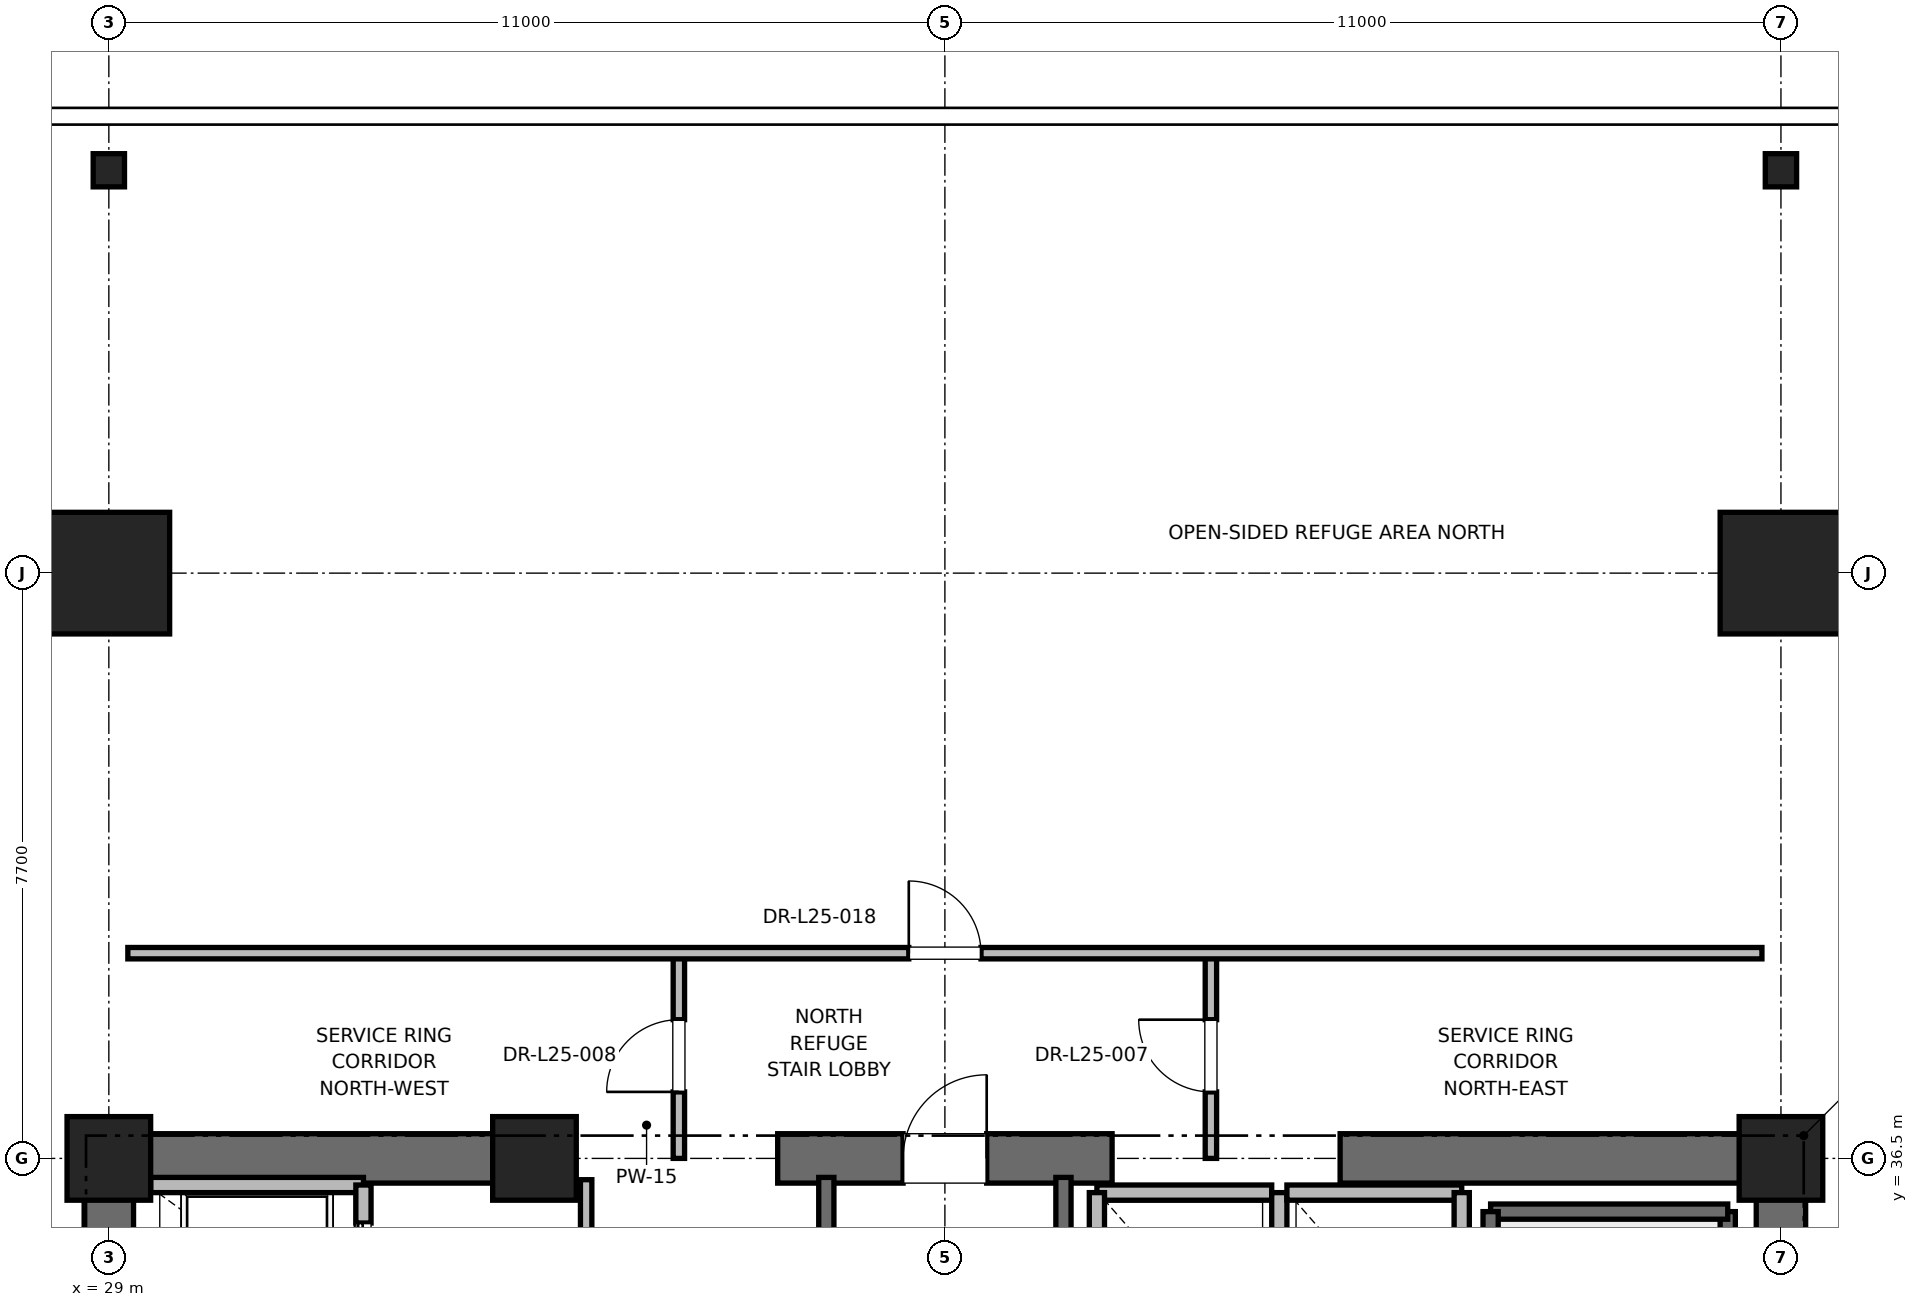
"""IFC4 building model, lengths in metres.
Left out: names, types, materials, properties, quantities, classifications, styles, units other than length and angle.
Written with IfcOpenShell. Run it as: python <this file> out.ifc"""

import sys

from ifc_helpers import new_model, si_unit, direction, frame, frame_2d, origin, origin_2d, place, context, subcontext, project, spatial, rectangle, i_section, extrude, element, fill, save


model = new_model("IFC4")
c1 = context("Model", 3, precision=1e-05, world=origin(), true_north=direction((0.0, 1.0)))
c2 = subcontext(c1, "Body", "Model", "MODEL_VIEW")
j1 = project(units=[si_unit("LENGTHUNIT", "METRE"), si_unit("PLANEANGLEUNIT", "RADIAN")], contexts=[c1])
p1 = place(None, origin())
s1 = spatial("IfcSite", under=j1, at=p1, CompositionType="ELEMENT")
p2 = place(p1, origin())
s2 = spatial("IfcBuilding", under=s1, at=p2, CompositionType="ELEMENT")
p3 = place(p2, frame((0.0, 0.0, 107.6)))
s3 = spatial("IfcBuildingStorey", under=s2, at=p3, CompositionType="ELEMENT", Elevation=107.6)
for number, where, z_axis, x_axis in (
    (1, (29.0, 44.2, 0.0), (0.0, 0.0, 1.0), (1.0, 0.0, 0.0)),
    (2, (51.0, 44.2, 0.0), (0.0, 0.0, 1.0), (1.0, 0.0, 0.0)),
):
    element("IfcColumn", number, at=place(p3, frame(where, z_axis=z_axis, x_axis=x_axis)), inside=s3, PredefinedType="COLUMN", context=c2, shape_type="SweptSolid", body=[
        extrude(rectangle(XDim=1.6, YDim=1.6, at=origin_2d()), origin(), (0.0, 0.0, 1.0), 5.4),
    ])
for number, where, z_axis, x_axis in (
    (3, (29.0, 49.5, 0.0), (0.0, 0.0, 1.0), (1.0, 0.0, 0.0)),
    (4, (51.0, 49.5, 0.0), (0.0, 0.0, 1.0), (1.0, 0.0, 0.0)),
):
    element("IfcColumn", number, at=place(p3, frame(where, z_axis=z_axis, x_axis=x_axis)), inside=s3, PredefinedType="COLUMN", context=c2, shape_type="SweptSolid", body=[
        extrude(i_section(OverallWidth=0.412, OverallDepth=0.437, WebThickness=0.036, FlangeThickness=0.058, FilletRadius=0.015, at=origin_2d()), origin(), (0.0, 0.0, 1.0), 5.4),
    ])
for number, where, z_axis, x_axis in (
    (5, (29.0, 36.5, 0.0), (0.0, 0.0, 1.0), (1.0, 0.0, 0.0)),
    (6, (51.0, 36.5, 0.0), (0.0, 0.0, 1.0), (1.0, 0.0, 0.0)),
    (7, (34.6, 36.5, 0.0), (0.0, 0.0, 1.0), (1.0, 0.0, 0.0)),
):
    element("IfcColumn", number, at=place(p3, frame(where, z_axis=z_axis, x_axis=x_axis)), inside=s3, PredefinedType="PILASTER", context=c2, shape_type="SweptSolid", body=[
        extrude(rectangle(XDim=1.1, YDim=1.1, at=origin_2d()), origin(), (0.0, 0.0, 1.0), 5.4),
    ])
p4 = place(p3, frame((29.0, 36.5, 0.0), z_axis=(0.0, 0.0, 1.0), x_axis=(1.0, 0.0, 0.0)))
e8 = element("IfcWall", 8, at=p4, inside=s3, PredefinedType="SHEAR", context=c2, shape_type="SweptSolid", body=[
    extrude(rectangle(XDim=5.8, YDim=0.65, at=frame_2d((2.9, 0.0))), origin(), (0.0, 0.0, 1.0), 5.1),
])
p5 = place(p3, frame((37.8, 36.5, 0.0), z_axis=(0.0, 0.0, 1.0), x_axis=(1.0, 0.0, 0.0)))
e9 = element("IfcWall", 9, at=p5, inside=s3, PredefinedType="SHEAR", context=c2, shape_type="SweptSolid", body=[
    extrude(rectangle(XDim=4.4, YDim=0.65, at=frame_2d((2.2, 0.0))), origin(), (0.0, 0.0, 1.0), 5.1),
])
p6 = place(p5, frame((1.65, 0.0, 0.0)))
e10 = element("IfcOpeningElement", 10, at=p6, cuts=e9, PredefinedType="OPENING", context=c2, shape_type="SweptSolid", body=[
    extrude(rectangle(XDim=1.1, YDim=2.15, at=frame_2d((0.55, 1.075))), frame((0.0, 0.325, 0.0), z_axis=(0.0, -1.0, 0.0), x_axis=(1.0, 0.0, 0.0)), (0.0, 0.0, 1.0), 0.65),
])
for number, where, z_axis, x_axis in (
    (11, (45.2, 36.5, 0.0), (0.0, 0.0, 1.0), (1.0, 0.0, 0.0)),
    (12, (29.0, 30.7, 0.0), (0.0, 0.0, 1.0), (0.0, 1.0, 0.0)),
):
    element("IfcWall", number, at=place(p3, frame(where, z_axis=z_axis, x_axis=x_axis)), inside=s3, PredefinedType="SHEAR", context=c2, shape_type="SweptSolid", body=[
        extrude(rectangle(XDim=5.8, YDim=0.65, at=frame_2d((2.9, 0.0))), origin(), (0.0, 0.0, 1.0), 5.1),
    ])
p7 = place(p3, frame((51.0, 27.7, 0.0), z_axis=(0.0, 0.0, 1.0), x_axis=(0.0, 1.0, 0.0)))
e13 = element("IfcWall", 13, at=p7, inside=s3, PredefinedType="SHEAR", context=c2, shape_type="SweptSolid", body=[
    extrude(rectangle(XDim=8.8, YDim=0.65, at=frame_2d((4.4, 0.0))), origin(), (0.0, 0.0, 1.0), 5.1),
])
p8 = place(p3, frame((50.3, 27.65, 0.0), z_axis=(0.0, 0.0, 1.0), x_axis=(0.0, 1.0, 0.0)))
e14 = element("IfcWall", 14, at=p8, inside=s3, PredefinedType="SOLIDWALL", context=c2, shape_type="SweptSolid", body=[
    extrude(rectangle(XDim=8.15, YDim=0.2, at=frame_2d((4.075, 0.0))), origin(), (0.0, 0.0, 1.0), 5.1),
])
p9 = place(p3, frame((47.18, 35.8, 0.0), z_axis=(0.0, 0.0, 1.0), x_axis=(1.0, 0.0, 0.0)))
e15 = element("IfcWall", 15, at=p9, inside=s3, PredefinedType="SOLIDWALL", context=c2, shape_type="SweptSolid", body=[
    extrude(rectangle(XDim=3.12, YDim=0.2, at=frame_2d((1.56, 0.0))), origin(), (0.0, 0.0, 1.0), 5.1),
])
p10 = place(p3, frame((47.18, 27.62, 0.0), z_axis=(0.0, 0.0, 1.0), x_axis=(0.0, 1.0, 0.0)))
e16 = element("IfcWall", 16, at=p10, inside=s3, PredefinedType="SOLIDWALL", context=c2, shape_type="SweptSolid", body=[
    extrude(rectangle(XDim=8.18, YDim=0.2, at=frame_2d((4.09, 0.0))), origin(), (0.0, 0.0, 1.0), 5.1),
])
p11 = place(p3, frame((38.44, 27.38, 0.0), z_axis=(0.0, 0.0, 1.0), x_axis=(0.0, 1.0, 0.0)))
e17 = element("IfcWall", 17, at=p11, inside=s3, PredefinedType="SOLIDWALL", context=c2, shape_type="SweptSolid", body=[
    extrude(rectangle(XDim=8.87, YDim=0.2, at=frame_2d((4.435, 0.0))), origin(), (0.0, 0.0, 1.0), 5.1),
])
p12 = place(p3, frame((41.56, 27.68, 0.0), z_axis=(0.0, 0.0, 1.0), x_axis=(0.0, 1.0, 0.0)))
e18 = element("IfcWall", 18, at=p12, inside=s3, PredefinedType="SOLIDWALL", context=c2, shape_type="SweptSolid", body=[
    extrude(rectangle(XDim=8.57, YDim=0.2, at=frame_2d((4.285, 0.0))), origin(), (0.0, 0.0, 1.0), 5.1),
])
p13 = place(p3, frame((32.35, 36.15, 0.0), z_axis=(0.0, 0.0, 1.0), x_axis=(-1.0, 0.0, 0.0)))
e19 = element("IfcWall", 19, at=p13, inside=s3, PredefinedType="SOLIDWALL", context=c2, shape_type="SweptSolid", body=[
    extrude(rectangle(XDim=2.8, YDim=0.2, at=frame_2d((1.4, 0.0))), origin(), (0.0, 0.0, 1.0), 4.153),
])
p14 = place(p3, frame((32.35, 34.05, 0.0), z_axis=(0.0, 0.0, 1.0), x_axis=(0.0, 1.0, 0.0)))
e20 = element("IfcWall", 20, at=p14, inside=s3, PredefinedType="SOLIDWALL", context=c2, shape_type="SweptSolid", body=[
    extrude(rectangle(XDim=2.1, YDim=0.2, at=frame_2d((1.05, 0.0))), origin(), (0.0, 0.0, 1.0), 5.1),
])
p15 = place(p14, frame((0.5, 0.0, 0.0)))
e21 = element("IfcOpeningElement", 21, at=p15, cuts=e20, PredefinedType="OPENING", context=c2, shape_type="SweptSolid", body=[
    extrude(rectangle(XDim=1.1, YDim=2.2, at=frame_2d((0.55, 1.1))), frame((0.0, 0.1, 0.0), z_axis=(0.0, -1.0, 0.0), x_axis=(1.0, 0.0, 0.0)), (0.0, 0.0, 1.0), 0.2),
])
p16 = place(p3, frame((44.3, 36.05, 0.0), z_axis=(0.0, 0.0, 1.0), x_axis=(-1.0, 0.0, 0.0)))
e22 = element("IfcWall", 22, at=p16, inside=s3, PredefinedType="SOLIDWALL", context=c2, shape_type="SweptSolid", body=[
    extrude(rectangle(XDim=2.3, YDim=0.2, at=frame_2d((1.15, 0.0))), origin(), (0.0, 0.0, 1.0), 3.88),
])
for number, where, z_axis, x_axis in (
    (23, (42.0, 36.05, 0.0), (0.0, 0.0, 1.0), (0.0, -1.0, 0.0)),
    (24, (44.4, 33.45, 0.0), (0.0, 0.0, 1.0), (0.0, 1.0, 0.0)),
):
    element("IfcWall", number, at=place(p3, frame(where, z_axis=z_axis, x_axis=x_axis)), inside=s3, PredefinedType="SOLIDWALL", context=c2, shape_type="SweptSolid", body=[
        extrude(rectangle(XDim=2.6, YDim=0.2, at=frame_2d((1.3, 0.0))), origin(), (0.0, 0.0, 1.0), 3.88),
    ])
p17 = place(p3, frame((46.8, 36.05, 0.0), z_axis=(0.0, 0.0, 1.0), x_axis=(-1.0, 0.0, 0.0)))
e25 = element("IfcWall", 25, at=p17, inside=s3, PredefinedType="SOLIDWALL", context=c2, shape_type="SweptSolid", body=[
    extrude(rectangle(XDim=2.3, YDim=0.2, at=frame_2d((1.15, 0.0))), origin(), (0.0, 0.0, 1.0), 3.88),
])
p18 = place(p3, frame((46.8, 33.45, 0.0), z_axis=(0.0, 0.0, 1.0), x_axis=(0.0, 1.0, 0.0)))
e26 = element("IfcWall", 26, at=p18, inside=s3, PredefinedType="SOLIDWALL", context=c2, shape_type="SweptSolid", body=[
    extrude(rectangle(XDim=2.6, YDim=0.2, at=frame_2d((1.3, 0.0))), origin(), (0.0, 0.0, 1.0), 5.1),
])
p19 = place(p3, frame((35.28, 33.95, 0.0), z_axis=(0.0, 0.0, 1.0), x_axis=(0.0, 1.0, 0.0)))
e27 = element("IfcWall", 27, at=p19, inside=s3, PredefinedType="PARTITIONING", context=c2, shape_type="SweptSolid", body=[
    extrude(rectangle(XDim=2.27, YDim=0.15, at=frame_2d((1.135, 0.0))), origin(), (0.0, 0.0, 1.0), 2.85),
])
p20 = place(p19, frame((0.66, 0.0, 0.0)))
e28 = element("IfcOpeningElement", 28, at=p20, cuts=e27, PredefinedType="OPENING", context=c2, shape_type="SweptSolid", body=[
    extrude(rectangle(XDim=0.95, YDim=2.15, at=frame_2d((0.475, 1.075))), frame((0.0, 0.075, 0.0), z_axis=(0.0, -1.0, 0.0), x_axis=(1.0, 0.0, 0.0)), (0.0, 0.0, 1.0), 0.15),
])
p21 = place(p3, frame((36.5, 36.5, 0.0), z_axis=(0.0, 0.0, 1.0), x_axis=(0.0, 1.0, 0.0)))
e29 = element("IfcWall", 29, at=p21, inside=s3, PredefinedType="PARTITIONING", context=c2, shape_type="SweptSolid", body=[
    extrude(rectangle(XDim=2.7, YDim=0.15, at=frame_2d((1.35, 0.0))), origin(), (0.0, 0.0, 1.0), 2.85),
])
p22 = place(p21, frame((0.875, 0.0, 0.0)))
e30 = element("IfcOpeningElement", 30, at=p22, cuts=e29, PredefinedType="OPENING", context=c2, shape_type="SweptSolid", body=[
    extrude(rectangle(XDim=0.95, YDim=2.15, at=frame_2d((0.475, 1.075))), frame((0.0, 0.075, 0.0), z_axis=(0.0, -1.0, 0.0), x_axis=(1.0, 0.0, 0.0)), (0.0, 0.0, 1.0), 0.15),
])
p23 = place(p3, frame((43.5, 36.5, 0.0), z_axis=(0.0, 0.0, 1.0), x_axis=(0.0, 1.0, 0.0)))
e31 = element("IfcWall", 31, at=p23, inside=s3, PredefinedType="PARTITIONING", context=c2, shape_type="SweptSolid", body=[
    extrude(rectangle(XDim=2.7, YDim=0.15, at=frame_2d((1.35, 0.0))), origin(), (0.0, 0.0, 1.0), 2.85),
])
p24 = place(p23, frame((0.875, 0.0, 0.0)))
e32 = element("IfcOpeningElement", 32, at=p24, cuts=e31, PredefinedType="OPENING", context=c2, shape_type="SweptSolid", body=[
    extrude(rectangle(XDim=0.95, YDim=2.15, at=frame_2d((0.475, 1.075))), frame((0.0, 0.075, 0.0), z_axis=(0.0, -1.0, 0.0), x_axis=(1.0, 0.0, 0.0)), (0.0, 0.0, 1.0), 0.15),
])
p25 = place(p3, frame((29.25, 39.2, 0.0), z_axis=(0.0, 0.0, 1.0), x_axis=(1.0, 0.0, 0.0)))
e33 = element("IfcWall", 33, at=p25, inside=s3, PredefinedType="PARTITIONING", context=c2, shape_type="SweptSolid", body=[
    extrude(rectangle(XDim=21.5, YDim=0.15, at=frame_2d((10.75, 0.0))), origin(), (0.0, 0.0, 1.0), 2.85),
])
p26 = place(p25, frame((10.275, 0.0, 0.0)))
e34 = element("IfcOpeningElement", 34, at=p26, cuts=e33, PredefinedType="OPENING", context=c2, shape_type="SweptSolid", body=[
    extrude(rectangle(XDim=0.95, YDim=2.15, at=frame_2d((0.475, 1.075))), frame((0.0, 0.075, 0.0), z_axis=(0.0, -1.0, 0.0), x_axis=(1.0, 0.0, 0.0)), (0.0, 0.0, 1.0), 0.15),
])
p27 = place(p6, origin())
e35 = element("IfcDoor", 35, at=p27, inside=s3, OperationType="SINGLE_SWING_RIGHT", PredefinedType="DOOR", context=c2, shape_type="SweptSolid", body=[
    extrude(rectangle(XDim=1.1, YDim=2.15, at=frame_2d((0.55, 1.075))), frame((0.0, 0.025, 0.0), z_axis=(0.0, -1.0, 0.0), x_axis=(1.0, 0.0, 0.0)), (0.0, 0.0, 1.0), 0.05),
])
fill(e10, e35)
p28 = place(p15, origin())
e36 = element("IfcDoor", 36, at=p28, inside=s3, OperationType="SLIDING_TO_RIGHT", PredefinedType="DOOR", context=c2, shape_type="SweptSolid", body=[
    extrude(rectangle(XDim=1.1, YDim=2.2, at=frame_2d((0.55, 1.1))), frame((0.0, 0.025, 0.0), z_axis=(0.0, -1.0, 0.0), x_axis=(1.0, 0.0, 0.0)), (0.0, 0.0, 1.0), 0.05),
])
fill(e21, e36)
p29 = place(p22, origin())
e37 = element("IfcDoor", 37, at=p29, inside=s3, OperationType="SINGLE_SWING_LEFT", PredefinedType="DOOR", context=c2, shape_type="SweptSolid", body=[
    extrude(rectangle(XDim=0.95, YDim=2.15, at=frame_2d((0.475, 1.075))), frame((0.0, 0.025, 0.0), z_axis=(0.0, -1.0, 0.0), x_axis=(1.0, 0.0, 0.0)), (0.0, 0.0, 1.0), 0.05),
])
fill(e30, e37)
p30 = place(p24, origin())
e38 = element("IfcDoor", 38, at=p30, inside=s3, OperationType="SINGLE_SWING_RIGHT", PredefinedType="DOOR", context=c2, shape_type="SweptSolid", body=[
    extrude(rectangle(XDim=0.95, YDim=2.15, at=frame_2d((0.475, 1.075))), frame((0.0, 0.025, 0.0), z_axis=(0.0, -1.0, 0.0), x_axis=(1.0, 0.0, 0.0)), (0.0, 0.0, 1.0), 0.05),
])
fill(e32, e38)
p31 = place(p26, origin())
e39 = element("IfcDoor", 39, at=p31, inside=s3, OperationType="SINGLE_SWING_LEFT", PredefinedType="DOOR", context=c2, shape_type="SweptSolid", body=[
    extrude(rectangle(XDim=0.95, YDim=2.15, at=frame_2d((0.475, 1.075))), frame((0.0, 0.025, 0.0), z_axis=(0.0, -1.0, 0.0), x_axis=(1.0, 0.0, 0.0)), (0.0, 0.0, 1.0), 0.05),
])
fill(e34, e39)
save(model, sys.argv[1])
